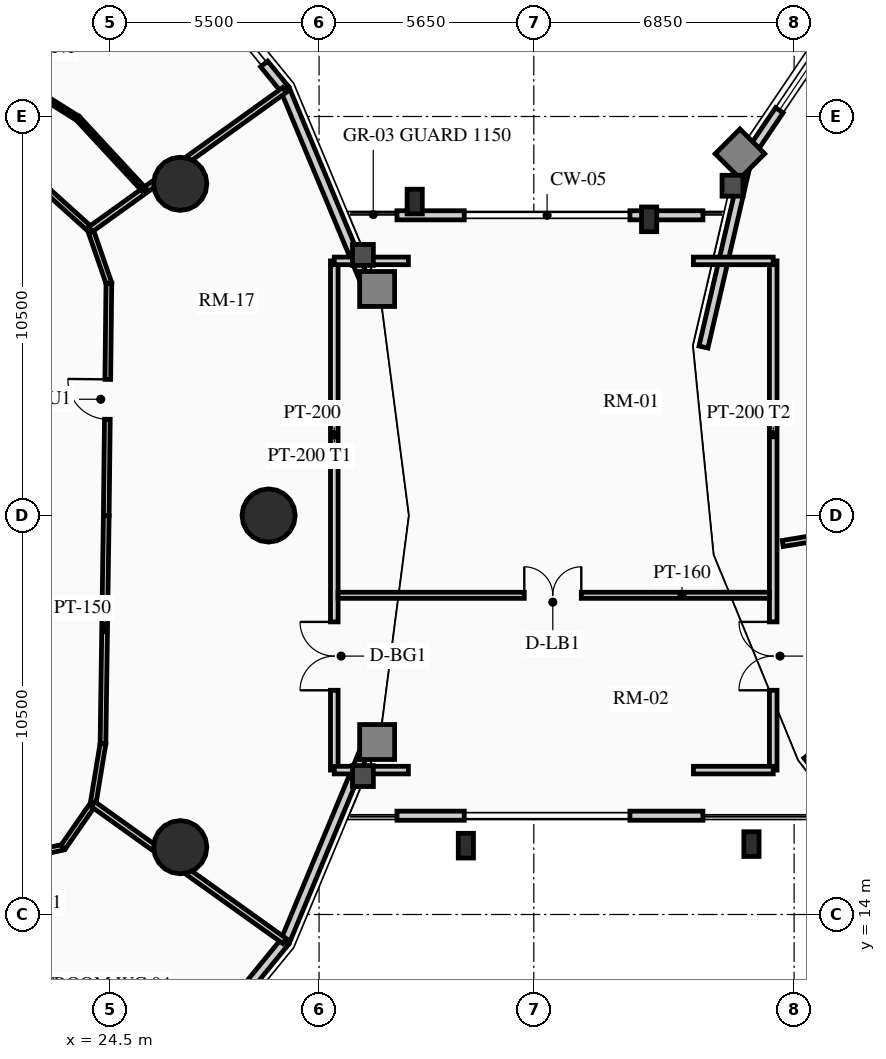
"""IFC4 building model, lengths in metres.
Left out: names, types, materials, properties, quantities, classifications, styles, units other than length and angle.
Written with IfcOpenShell. Run it as: python <this file> out.ifc"""

import sys

from ifc_helpers import new_model, si_unit, direction, frame, frame_2d, origin, origin_2d, place, context, subcontext, project, spatial, rectangle, hollow_rectangle, circle, extrude, source, transform, mapped, element, fill, save


model = new_model("IFC4")
c1 = context("Model", 3, precision=1e-05, world=origin(), true_north=direction((0.0, 1.0)))
c2 = subcontext(c1, "Body", "Model", "MODEL_VIEW")
j1 = project(units=[si_unit("LENGTHUNIT", "METRE"), si_unit("PLANEANGLEUNIT", "RADIAN")], contexts=[c1])
p1 = place(None, origin())
s1 = spatial("IfcSite", under=j1, at=p1, CompositionType="ELEMENT")
p2 = place(p1, origin())
s2 = spatial("IfcBuilding", under=s1, at=p2, CompositionType="ELEMENT")
p3 = place(p2, frame((0.0, 0.0, 129.16)))
s3 = spatial("IfcBuildingStorey", under=s2, at=p3, CompositionType="ELEMENT", Elevation=129.16)
for number, where, z_axis, x_axis in (
    (1, (28.672, 24.5, 0.0), (0.0, 0.0, 1.0), (1.0, 0.0, 0.0)),
    (2, (26.347, 33.229, 0.0), (0.0, 0.0, 1.0), (1.0, 0.0, 0.0)),
    (3, (26.347, 15.771, 0.0), (0.0, 0.0, 1.0), (1.0, 0.0, 0.0)),
):
    element("IfcColumn", number, at=place(p3, frame(where, z_axis=z_axis, x_axis=x_axis)), inside=s3, PredefinedType="USERDEFINED", context=c2, shape_type="SweptSolid", body=[
        extrude(circle(Radius=0.7, at=origin_2d()), origin(), (0.0, 0.0, 1.0), 3.72),
    ])
for number, where, z_axis, x_axis in (
    (4, (33.863, 15.812, 0.0), (0.0, 0.0, 1.0), (1.0, 0.0, 0.0)),
    (5, (41.378, 15.853, 0.0), (0.0, 0.0, 1.0), (1.0, 0.0, 0.0)),
    (6, (32.516, 32.761, 0.0), (0.0, 0.0, 1.0), (1.0, 0.0, 0.0)),
    (7, (38.685, 32.294, 0.0), (0.0, 0.0, 1.0), (1.0, 0.0, 0.0)),
):
    element("IfcColumn", number, at=place(p3, frame(where, z_axis=z_axis, x_axis=x_axis)), inside=s3, PredefinedType="COLUMN", context=c2, shape_type="SweptSolid", body=[
        extrude(hollow_rectangle(XDim=0.4, YDim=0.65, WallThickness=0.025, at=origin_2d()), origin(), (0.0, 0.0, 1.0), 3.72),
    ])
p4 = place(p3, frame((29.105, 35.709, 0.0), z_axis=(0.0, 0.0, 1.0), x_axis=(0.384344417632, -0.923189779317, 0.0)))
e8 = element("IfcWall", 8, at=p4, inside=s3, PredefinedType="SOLIDWALL", context=c2, shape_type="SweptSolid", body=[
    extrude(rectangle(XDim=5.758, YDim=0.24, at=frame_2d((2.879, 0.0))), origin(), (0.0, 0.0, 1.0), 2.949),
])
p5 = place(p3, frame((28.555, 36.383, 0.0), z_axis=(0.0, 0.0, 1.0), x_axis=(0.632702874536, -0.774394649099, 0.0)))
e9 = element("IfcWall", 9, at=p5, inside=s3, PredefinedType="SOLIDWALL", context=c2, shape_type="SweptSolid", body=[
    extrude(rectangle(XDim=0.87, YDim=0.24, at=frame_2d((0.435, 0.0))), origin(), (0.0, 0.0, 1.0), 2.949),
])
p6 = place(p3, frame((29.105, 13.291, 0.0), z_axis=(0.0, 0.0, 1.0), x_axis=(-0.632700781152, -0.77439635945, 0.0)))
e10 = element("IfcWall", 10, at=p6, inside=s3, PredefinedType="SOLIDWALL", context=c2, shape_type="SweptSolid", body=[
    extrude(rectangle(XDim=5.448, YDim=0.24, at=frame_2d((2.724, 0.0))), origin(), (0.0, 0.0, 1.0), 2.949),
])
m1 = source(origin(), c2, "Body", "SweptSolid", [
    extrude(rectangle(XDim=1.9, YDim=1.35, at=frame_2d((0.95, 0.675))), frame((0.0, 0.13, 0.0), z_axis=(0.0, -1.0, 0.0), x_axis=(1.0, 0.0, 0.0)), (0.0, 0.0, 1.0), 0.26),
])
p7 = place(p6, frame((1.774, 0.0, 0.65)))
e11 = element("IfcOpeningElement", 11, at=p7, cuts=e10, PredefinedType="OPENING", context=c2, shape_type="MappedRepresentation", body=[
    mapped(m1, transform((0.0, 0.0, 0.0), x_axis=(1.0, 0.0, 0.0), y_axis=(0.0, 1.0, 0.0), z_axis=(0.0, 0.0, 1.0), scale=1.0)),
])
p8 = place(p3, frame((31.318, 18.607, 0.0), z_axis=(0.0, 0.0, 1.0), x_axis=(-0.384344417632, -0.923189779317, 0.0)))
e12 = element("IfcWall", 12, at=p8, inside=s3, PredefinedType="SOLIDWALL", context=c2, shape_type="SweptSolid", body=[
    extrude(rectangle(XDim=5.758, YDim=0.24, at=frame_2d((2.879, 0.0))), origin(), (0.0, 0.0, 1.0), 2.949),
])
p9 = place(p3, frame((41.271, 33.92, 0.0), z_axis=(0.0, 0.0, 1.0), x_axis=(0.559572880421, 0.828781148131, 0.0)))
e13 = element("IfcWall", 13, at=p9, inside=s3, PredefinedType="SOLIDWALL", context=c2, shape_type="SweptSolid", body=[
    extrude(rectangle(XDim=4.905, YDim=0.24, at=frame_2d((2.452, 0.0))), origin(), (0.0, 0.0, 1.0), 2.949),
])
p10 = place(p9, frame((1.502, 0.0, 0.65)))
e14 = element("IfcOpeningElement", 14, at=p10, cuts=e13, PredefinedType="OPENING", context=c2, shape_type="MappedRepresentation", body=[
    mapped(m1, transform((0.0, 0.0, 0.0), x_axis=(1.0, 0.0, 0.0), y_axis=(0.0, 1.0, 0.0), z_axis=(0.0, 0.0, 1.0), scale=1.0)),
])
p11 = place(p3, frame((40.115, 28.933, 0.0), z_axis=(0.0, 0.0, 1.0), x_axis=(0.225834725257, 0.974165631126, 0.0)))
e15 = element("IfcWall", 15, at=p11, inside=s3, PredefinedType="SOLIDWALL", context=c2, shape_type="SweptSolid", body=[
    extrude(rectangle(XDim=5.119, YDim=0.24, at=frame_2d((2.56, 0.0))), origin(), (0.0, 0.0, 1.0), 2.949),
])
p12 = place(p3, frame((46.483, 13.483, 0.0), z_axis=(0.0, 0.0, 1.0), x_axis=(-0.61054437102, 0.791982052206, 0.0)))
e16 = element("IfcWall", 16, at=p12, inside=s3, PredefinedType="SOLIDWALL", context=c2, shape_type="SweptSolid", body=[
    extrude(rectangle(XDim=5.942, YDim=0.24, at=frame_2d((2.971, 0.0))), origin(), (0.0, 0.0, 1.0), 2.949),
])
p13 = place(p3, frame((32.05, 32.4, 0.0), z_axis=(0.0, 0.0, 1.0), x_axis=(1.0, 0.0, 0.0)))
e17 = element("IfcWall", 17, at=p13, inside=s3, PredefinedType="SOLIDWALL", context=c2, shape_type="SweptSolid", body=[
    extrude(rectangle(XDim=1.77, YDim=0.24, at=frame_2d((0.885, 0.0))), origin(), (0.0, 0.0, 1.0), 2.512),
])
for number, where, z_axis, x_axis in (
    (18, (38.18, 32.4, 0.0), (0.0, 0.0, 1.0), (1.0, 0.0, 0.0)),
    (19, (40.1, 16.6, 0.0), (0.0, 0.0, 1.0), (-1.0, 0.0, 0.0)),
):
    element("IfcWall", number, at=place(p3, frame(where, z_axis=z_axis, x_axis=x_axis)), inside=s3, PredefinedType="SOLIDWALL", context=c2, shape_type="SweptSolid", body=[
        extrude(rectangle(XDim=1.92, YDim=0.24, at=frame_2d((0.96, 0.0))), origin(), (0.0, 0.0, 1.0), 2.512),
    ])
p14 = place(p3, frame((33.82, 16.6, 0.0), z_axis=(0.0, 0.0, 1.0), x_axis=(-1.0, 0.0, 0.0)))
e20 = element("IfcWall", 20, at=p14, inside=s3, PredefinedType="SOLIDWALL", context=c2, shape_type="SweptSolid", body=[
    extrude(rectangle(XDim=1.77, YDim=0.24, at=frame_2d((0.885, 0.0))), origin(), (0.0, 0.0, 1.0), 2.512),
])
p15 = place(p3, frame((30.4, 17.8, 0.0), z_axis=(0.0, 0.0, 1.0), x_axis=(0.0, 1.0, 0.0)))
e21 = element("IfcWall", 21, at=p15, inside=s3, PredefinedType="PARTITIONING", context=c2, shape_type="SweptSolid", body=[
    extrude(rectangle(XDim=13.4, YDim=0.2, at=frame_2d((6.7, 0.0))), origin(), (0.0, 0.0, 1.0), 2.949),
])
m2 = source(origin(), c2, "Body", "SweptSolid", [
    extrude(rectangle(XDim=1.8, YDim=2.05, at=frame_2d((0.9, 1.025))), frame((0.0, 0.11, 0.0), z_axis=(0.0, -1.0, 0.0), x_axis=(1.0, 0.0, 0.0)), (0.0, 0.0, 1.0), 0.22),
])
p16 = place(p15, frame((2.1, 0.0, 0.0)))
e22 = element("IfcOpeningElement", 22, at=p16, cuts=e21, PredefinedType="OPENING", context=c2, shape_type="MappedRepresentation", body=[
    mapped(m2, transform((0.0, 0.0, 0.0), x_axis=(1.0, 0.0, 0.0), y_axis=(0.0, 1.0, 0.0), z_axis=(0.0, 0.0, 1.0), scale=1.0)),
])
p17 = place(p3, frame((41.95, 17.8, 0.0), z_axis=(0.0, 0.0, 1.0), x_axis=(0.0, 1.0, 0.0)))
e23 = element("IfcWall", 23, at=p17, inside=s3, PredefinedType="PARTITIONING", context=c2, shape_type="SweptSolid", body=[
    extrude(rectangle(XDim=13.4, YDim=0.2, at=frame_2d((6.7, 0.0))), origin(), (0.0, 0.0, 1.0), 2.949),
])
p18 = place(p17, frame((2.1, 0.0, 0.0)))
e24 = element("IfcOpeningElement", 24, at=p18, cuts=e23, PredefinedType="OPENING", context=c2, shape_type="MappedRepresentation", body=[
    mapped(m2, transform((0.0, 0.0, 0.0), x_axis=(1.0, 0.0, 0.0), y_axis=(0.0, 1.0, 0.0), z_axis=(0.0, 0.0, 1.0), scale=1.0)),
])
for number, where, z_axis, x_axis in (
    (25, (30.4, 31.2, 0.0), (0.0, 0.0, 1.0), (1.0, 0.0, 0.0)),
    (26, (30.4, 17.8, 0.0), (0.0, 0.0, 1.0), (1.0, 0.0, 0.0)),
):
    element("IfcWall", number, at=place(p3, frame(where, z_axis=z_axis, x_axis=x_axis)), inside=s3, PredefinedType="PARTITIONING", context=c2, shape_type="SweptSolid", body=[
        extrude(rectangle(XDim=1.95, YDim=0.2, at=frame_2d((0.975, 0.0))), origin(), (0.0, 0.0, 1.0), 2.949),
    ])
p19 = place(p3, frame((39.85, 31.2, 0.0), z_axis=(0.0, 0.0, 1.0), x_axis=(1.0, 0.0, 0.0)))
e27 = element("IfcWall", 27, at=p19, inside=s3, PredefinedType="PARTITIONING", context=c2, shape_type="SweptSolid", body=[
    extrude(rectangle(XDim=2.1, YDim=0.2, at=frame_2d((1.05, 0.0))), origin(), (0.0, 0.0, 1.0), 2.949),
])
p20 = place(p3, frame((39.85, 17.8, 0.0), z_axis=(0.0, 0.0, 1.0), x_axis=(1.0, 0.0, 0.0)))
e28 = element("IfcWall", 28, at=p20, inside=s3, PredefinedType="PARTITIONING", context=c2, shape_type="SweptSolid", body=[
    extrude(rectangle(XDim=2.1, YDim=0.2, at=frame_2d((1.05, 0.0))), origin(), (0.0, 0.0, 1.0), 2.712),
])
p21 = place(p3, frame((30.5, 22.4, 0.0), z_axis=(0.0, 0.0, 1.0), x_axis=(1.0, 0.0, 0.0)))
e29 = element("IfcWall", 29, at=p21, inside=s3, PredefinedType="PARTITIONING", context=c2, shape_type="SweptSolid", body=[
    extrude(rectangle(XDim=11.35, YDim=0.16, at=frame_2d((5.675, 0.0))), origin(), (0.0, 0.0, 1.0), 2.712),
])
m3 = source(origin(), c2, "Body", "SweptSolid", [
    extrude(rectangle(XDim=1.5, YDim=2.02, at=frame_2d((0.75, 1.01))), frame((0.0, 0.09, 0.0), z_axis=(0.0, -1.0, 0.0), x_axis=(1.0, 0.0, 0.0)), (0.0, 0.0, 1.0), 0.18),
])
p22 = place(p21, frame((4.9, 0.0, 0.0)))
e30 = element("IfcOpeningElement", 30, at=p22, cuts=e29, PredefinedType="OPENING", context=c2, shape_type="MappedRepresentation", body=[
    mapped(m3, transform((0.0, 0.0, 0.0), x_axis=(1.0, 0.0, 0.0), y_axis=(0.0, 1.0, 0.0), z_axis=(0.0, 0.0, 1.0), scale=1.0)),
])
p23 = place(p3, frame((24.4, 24.5, 0.0), z_axis=(0.0, 0.0, 1.0), x_axis=(0.011299841544, 0.999936154752, 0.0)))
e31 = element("IfcWall", 31, at=p23, inside=s3, PredefinedType="PARTITIONING", context=c2, shape_type="SweptSolid", body=[
    extrude(rectangle(XDim=6.115, YDim=0.15, at=frame_2d((3.057, 0.0))), origin(), (0.0, 0.0, 1.0), 2.995),
])
m4 = source(origin(), c2, "Body", "SweptSolid", [
    extrude(rectangle(XDim=1.05, YDim=2.015, at=frame_2d((0.525, 1.007))), frame((0.0, 0.085, 0.0), z_axis=(0.0, -1.0, 0.0), x_axis=(1.0, 0.0, 0.0)), (0.0, 0.0, 1.0), 0.17),
])
p24 = place(p23, frame((2.532, 0.0, 0.0)))
e32 = element("IfcOpeningElement", 32, at=p24, cuts=e31, PredefinedType="OPENING", context=c2, shape_type="MappedRepresentation", body=[
    mapped(m4, transform((0.0, 0.0, 0.0), x_axis=(1.0, 0.0, 0.0), y_axis=(0.0, 1.0, 0.0), z_axis=(0.0, 0.0, 1.0), scale=1.0)),
])
p25 = place(p3, frame((24.469, 30.614, 0.0), z_axis=(0.0, 0.0, 1.0), x_axis=(-0.327228335485, 0.944945298129, 0.0)))
e33 = element("IfcWall", 33, at=p25, inside=s3, PredefinedType="PARTITIONING", context=c2, shape_type="SweptSolid", body=[
    extrude(rectangle(XDim=1.495, YDim=0.15, at=frame_2d((0.748, 0.0))), origin(), (0.0, 0.0, 1.0), 2.995),
])
p26 = place(p3, frame((23.98, 32.027, 0.0), z_axis=(0.0, 0.0, 1.0), x_axis=(-0.742353224332, 0.670008724065, 0.0)))
e34 = element("IfcWall", 34, at=p26, inside=s3, PredefinedType="PARTITIONING", context=c2, shape_type="SweptSolid", body=[
    extrude(rectangle(XDim=1.485, YDim=0.15, at=frame_2d((0.742, 0.0))), origin(), (0.0, 0.0, 1.0), 2.995),
])
p27 = place(p3, frame((21.419, 15.369, 0.0), z_axis=(0.0, 0.0, 1.0), x_axis=(0.977192701953, 0.212354475464, 0.0)))
e35 = element("IfcWall", 35, at=p27, inside=s3, PredefinedType="PARTITIONING", context=c2, shape_type="SweptSolid", body=[
    extrude(rectangle(XDim=1.888, YDim=0.15, at=frame_2d((0.944, 0.0))), origin(), (0.0, 0.0, 1.0), 2.995),
])
m5 = source(origin(), c2, "Body", "SweptSolid", [
    extrude(rectangle(XDim=1.0, YDim=2.015, at=frame_2d((0.5, 1.007))), frame((0.0, 0.085, 0.0), z_axis=(0.0, -1.0, 0.0), x_axis=(1.0, 0.0, 0.0)), (0.0, 0.0, 1.0), 0.17),
])
p28 = place(p27, frame((0.444, 0.0, 0.0)))
e36 = element("IfcOpeningElement", 36, at=p28, cuts=e35, PredefinedType="OPENING", context=c2, shape_type="MappedRepresentation", body=[
    mapped(m5, transform((0.0, 0.0, 0.0), x_axis=(1.0, 0.0, 0.0), y_axis=(0.0, 1.0, 0.0), z_axis=(0.0, 0.0, 1.0), scale=1.0)),
])
p29 = place(p3, frame((23.263, 15.77, 0.0), z_axis=(0.0, 0.0, 1.0), x_axis=(0.570743456919, 0.821128434768, 0.0)))
e37 = element("IfcWall", 37, at=p29, inside=s3, PredefinedType="PARTITIONING", context=c2, shape_type="SweptSolid", body=[
    extrude(rectangle(XDim=1.382, YDim=0.15, at=frame_2d((0.691, 0.0))), origin(), (0.0, 0.0, 1.0), 2.995),
])
p30 = place(p3, frame((24.052, 16.905, 0.0), z_axis=(0.0, 0.0, 1.0), x_axis=(0.162091534225, 0.986775726562, 0.0)))
e38 = element("IfcWall", 38, at=p30, inside=s3, PredefinedType="PARTITIONING", context=c2, shape_type="SweptSolid", body=[
    extrude(rectangle(XDim=1.613, YDim=0.15, at=frame_2d((0.807, 0.0))), origin(), (0.0, 0.0, 1.0), 2.995),
])
p31 = place(p3, frame((24.313, 18.496, 0.0), z_axis=(0.0, 0.0, 1.0), x_axis=(0.014394019188, 0.999896400739, 0.0)))
e39 = element("IfcWall", 39, at=p31, inside=s3, PredefinedType="PARTITIONING", context=c2, shape_type="SweptSolid", body=[
    extrude(rectangle(XDim=6.004, YDim=0.15, at=frame_2d((3.002, 0.0))), origin(), (0.0, 0.0, 1.0), 3.425),
])
p32 = place(p3, frame((23.98, 32.027, 0.0), z_axis=(0.0, 0.0, 1.0), x_axis=(0.812162479031, 0.58343132214, 0.0)))
e40 = element("IfcWall", 40, at=p32, inside=s3, PredefinedType="PARTITIONING", context=c2, shape_type="SweptSolid", body=[
    extrude(rectangle(XDim=6.291, YDim=0.16, at=frame_2d((3.146, 0.0))), origin(), (0.0, 0.0, 1.0), 2.949),
])
p33 = place(p3, frame((24.052, 16.905, 0.0), z_axis=(0.0, 0.0, 1.0), x_axis=(0.813437670746, -0.581652091727, 0.0)))
e41 = element("IfcWall", 41, at=p33, inside=s3, PredefinedType="PARTITIONING", context=c2, shape_type="SweptSolid", body=[
    extrude(rectangle(XDim=6.192, YDim=0.16, at=frame_2d((3.096, 0.0))), origin(), (0.0, 0.0, 1.0), 2.949),
])
p34 = place(p3, frame((25.41, 33.054, 0.0), z_axis=(0.0, 0.0, 1.0), x_axis=(-0.679733694606, 0.73345899982, 0.0)))
e42 = element("IfcWall", 42, at=p34, inside=s3, PredefinedType="PARTITIONING", context=c2, shape_type="SweptSolid", body=[
    extrude(rectangle(XDim=2.586, YDim=0.125, at=frame_2d((1.293, 0.0))), origin(), (0.0, 0.0, 1.0), 3.425),
])
p35 = place(p3, frame((23.653, 34.951, 0.0), z_axis=(0.0, 0.0, 1.0), x_axis=(-0.847306782665, 0.531103771452, 0.0)))
e43 = element("IfcWall", 43, at=p35, inside=s3, PredefinedType="PARTITIONING", context=c2, shape_type="SweptSolid", body=[
    extrude(rectangle(XDim=2.581, YDim=0.125, at=frame_2d((1.291, 0.0))), origin(), (0.0, 0.0, 1.0), 2.995),
])
m6 = source(origin(), c2, "Body", "SweptSolid", [
    extrude(rectangle(XDim=0.9, YDim=2.005, at=frame_2d((0.45, 1.002))), frame((0.0, 0.073, 0.0), z_axis=(0.0, -1.0, 0.0), x_axis=(1.0, 0.0, 0.0)), (0.0, 0.0, 1.0), 0.145),
])
p36 = place(p35, frame((0.841, 0.0, 0.0)))
e44 = element("IfcOpeningElement", 44, at=p36, cuts=e43, PredefinedType="OPENING", context=c2, shape_type="MappedRepresentation", body=[
    mapped(m6, transform((0.0, 0.0, 0.0), x_axis=(1.0, 0.0, 0.0), y_axis=(0.0, 1.0, 0.0), z_axis=(0.0, 0.0, 1.0), scale=1.0)),
])
p37 = place(p3, frame((46.795, 24.513, 0.0), z_axis=(0.0, 0.0, 1.0), x_axis=(-0.986967402925, -0.160920308111, 0.0)))
e45 = element("IfcWall", 45, at=p37, inside=s3, PredefinedType="PARTITIONING", context=c2, shape_type="SweptSolid", body=[
    extrude(rectangle(XDim=4.656, YDim=0.16, at=frame_2d((2.328, 0.0))), origin(), (0.0, 0.0, 1.0), 2.949),
])
m7 = source(origin(), c2, "Body", "SweptSolid", [
    extrude(rectangle(XDim=1.9, YDim=1.35, at=frame_2d((0.95, 0.675))), frame((0.0, 0.03, 0.0), z_axis=(0.0, -1.0, 0.0), x_axis=(1.0, 0.0, 0.0)), (0.0, 0.0, 1.0), 0.06),
])
p38 = place(p10, origin())
e46 = element("IfcWindow", 46, at=p38, inside=s3, PartitioningType="DOUBLE_PANEL_VERTICAL", PredefinedType="WINDOW", context=c2, shape_type="MappedRepresentation", body=[
    mapped(m7, transform((0.0, 0.0, 0.0), x_axis=(1.0, 0.0, 0.0), y_axis=(0.0, 1.0, 0.0), z_axis=(0.0, 0.0, 1.0), scale=1.0)),
])
fill(e14, e46)
m8 = source(origin(), c2, "Body", "SweptSolid", [
    extrude(rectangle(XDim=1.8, YDim=2.05, at=frame_2d((0.9, 1.025))), frame((0.0, 0.025, 0.0), z_axis=(0.0, -1.0, 0.0), x_axis=(1.0, 0.0, 0.0)), (0.0, 0.0, 1.0), 0.05),
])
p39 = place(p16, origin())
e47 = element("IfcDoor", 47, at=p39, inside=s3, OperationType="DOUBLE_DOOR_SINGLE_SWING", PredefinedType="DOOR", context=c2, shape_type="MappedRepresentation", body=[
    mapped(m8, transform((0.0, 0.0, 0.0), x_axis=(1.0, 0.0, 0.0), y_axis=(0.0, 1.0, 0.0), z_axis=(0.0, 0.0, 1.0), scale=1.0)),
])
fill(e22, e47)
p40 = place(p18, origin())
e48 = element("IfcDoor", 48, at=p40, inside=s3, OperationType="DOUBLE_DOOR_SINGLE_SWING", PredefinedType="DOOR", context=c2, shape_type="MappedRepresentation", body=[
    mapped(m8, transform((0.0, 0.0, 0.0), x_axis=(1.0, 0.0, 0.0), y_axis=(0.0, 1.0, 0.0), z_axis=(0.0, 0.0, 1.0), scale=1.0)),
])
fill(e24, e48)
m9 = source(origin(), c2, "Body", "SweptSolid", [
    extrude(rectangle(XDim=1.5, YDim=2.02, at=frame_2d((0.75, 1.01))), frame((0.0, 0.025, 0.0), z_axis=(0.0, -1.0, 0.0), x_axis=(1.0, 0.0, 0.0)), (0.0, 0.0, 1.0), 0.05),
])
p41 = place(p22, origin())
e49 = element("IfcDoor", 49, at=p41, inside=s3, OperationType="DOUBLE_DOOR_SINGLE_SWING", PredefinedType="DOOR", context=c2, shape_type="MappedRepresentation", body=[
    mapped(m9, transform((0.0, 0.0, 0.0), x_axis=(1.0, 0.0, 0.0), y_axis=(0.0, 1.0, 0.0), z_axis=(0.0, 0.0, 1.0), scale=1.0)),
])
fill(e30, e49)
m10 = source(origin(), c2, "Body", "SweptSolid", [
    extrude(rectangle(XDim=1.05, YDim=2.015, at=frame_2d((0.525, 1.007))), frame((0.0, 0.025, 0.0), z_axis=(0.0, -1.0, 0.0), x_axis=(1.0, 0.0, 0.0)), (0.0, 0.0, 1.0), 0.05),
])
p42 = place(p24, origin())
e50 = element("IfcDoor", 50, at=p42, inside=s3, OperationType="SINGLE_SWING_RIGHT", PredefinedType="DOOR", context=c2, shape_type="MappedRepresentation", body=[
    mapped(m10, transform((0.0, 0.0, 0.0), x_axis=(1.0, 0.0, 0.0), y_axis=(0.0, 1.0, 0.0), z_axis=(0.0, 0.0, 1.0), scale=1.0)),
])
fill(e32, e50)
save(model, sys.argv[1])
